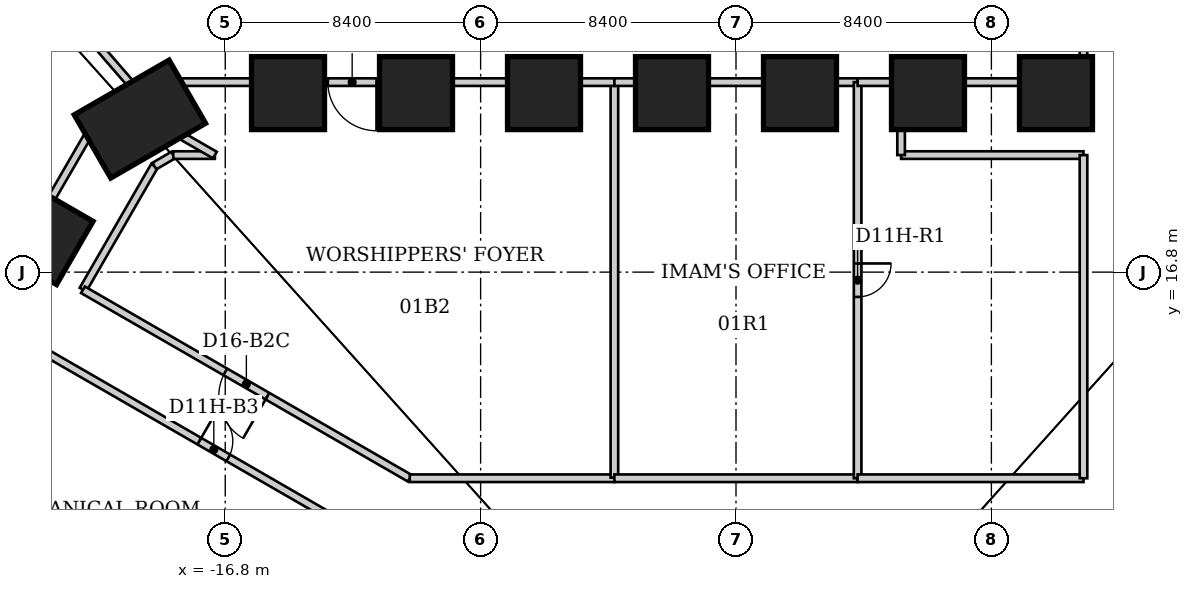
"""IFC4 building model, lengths in metres.
Left out: names, types, materials, properties, quantities, classifications, styles, units other than length and angle.
Written with IfcOpenShell. Run it as: python <this file> out.ifc"""

import sys

from ifc_helpers import new_model, si_unit, direction, frame, frame_2d, origin, origin_2d, place, context, subcontext, project, spatial, rectangle, extrude, element, fill, save


model = new_model("IFC4")
c1 = context("Model", 3, precision=1e-05, world=origin(), true_north=direction((0.0, 1.0)))
c2 = subcontext(c1, "Body", "Model", "MODEL_VIEW")
j1 = project(units=[si_unit("LENGTHUNIT", "METRE"), si_unit("PLANEANGLEUNIT", "RADIAN")], contexts=[c1])
p1 = place(None, origin())
s1 = spatial("IfcSite", under=j1, at=p1, CompositionType="ELEMENT")
p2 = place(p1, origin())
s2 = spatial("IfcBuilding", under=s1, at=p2, CompositionType="ELEMENT")
p3 = place(p2, frame((0.0, 0.0, 6.0)))
s3 = spatial("IfcBuildingStorey", under=s2, at=p3, CompositionType="ELEMENT", Elevation=6.0)
for number, where, z_axis, x_axis in (
    (1, (-14.735, 22.689, 0.0), (0.0, 0.0, 1.0), (0.0, 1.0, 0.0)),
    (2, (-10.525, 22.689, 0.0), (0.0, 0.0, 1.0), (0.0, 1.0, 0.0)),
    (3, (-6.315, 22.689, 0.0), (0.0, 0.0, 1.0), (0.0, 1.0, 0.0)),
    (4, (-2.105, 22.689, 0.0), (0.0, 0.0, 1.0), (0.0, 1.0, 0.0)),
    (5, (2.105, 22.689, 0.0), (0.0, 0.0, 1.0), (0.0, 1.0, 0.0)),
    (6, (6.315, 22.689, 0.0), (0.0, 0.0, 1.0), (0.0, 1.0, 0.0)),
    (7, (10.525, 22.689, 0.0), (0.0, 0.0, 1.0), (0.0, 1.0, 0.0)),
    (8, (-22.788, 18.032, 0.0), (0.0, 0.0, 1.0), (-0.866, 0.5, 0.0)),
):
    element("IfcColumn", number, at=place(p3, frame(where, z_axis=z_axis, x_axis=x_axis)), inside=s3, PredefinedType="COLUMN", context=c2, shape_type="SweptSolid", body=[
        extrude(rectangle(XDim=2.4, YDim=2.4, at=origin_2d()), origin(), (0.0, 0.0, 1.0), 6.0),
    ])
p4 = place(p3, frame((-19.606, 21.835, 0.0), z_axis=(0.0, 0.0, 1.0), x_axis=(-0.5, 0.866025403784, 0.0)))
e9 = element("IfcColumn", 9, at=p4, inside=s3, PredefinedType="COLUMN", context=c2, shape_type="SweptSolid", body=[
    extrude(rectangle(XDim=2.4, YDim=3.6, at=origin_2d()), origin(), (0.0, 0.0, 1.0), 6.0),
])
p5 = place(p3, frame((-22.68, 14.14, 0.0), z_axis=(0.0, 0.0, 1.0), x_axis=(0.866256251028, -0.499599947513, 0.0)))
e10 = element("IfcWall", 10, at=p5, inside=s3, PredefinedType="PARTITIONING", context=c2, shape_type="SweptSolid", body=[
    extrude(rectangle(XDim=12.71, YDim=0.25, at=frame_2d((6.355, 0.0))), origin(), (0.0, 0.0, 1.0), 5.84),
])
p6 = place(p5, frame((5.805, 0.0, 0.0)))
e11 = element("IfcOpeningElement", 11, at=p6, cuts=e10, PredefinedType="OPENING", context=c2, shape_type="SweptSolid", body=[
    extrude(rectangle(XDim=1.1, YDim=2.2, at=frame_2d((0.55, 1.1))), frame((0.0, 0.125, 0.0), z_axis=(0.0, -1.0, 0.0), x_axis=(1.0, 0.0, 0.0)), (0.0, 0.0, 1.0), 0.25),
])
p7 = place(p3, frame((-21.48, 16.22, 0.0), z_axis=(0.0, 0.0, 1.0), x_axis=(0.499999753078, 0.866025546345, 0.0)))
e12 = element("IfcWall", 12, at=p7, inside=s3, PredefinedType="PARTITIONING", context=c2, shape_type="SweptSolid", body=[
    extrude(rectangle(XDim=4.7, YDim=0.25, at=frame_2d((2.35, 0.0))), origin(), (0.0, 0.0, 1.0), 5.84),
])
p8 = place(p3, frame((-20.88, 22.05, 0.0), z_axis=(0.0, 0.0, 1.0), x_axis=(-0.50097690648, -0.86546065143, 0.0)))
e13 = element("IfcWall", 13, at=p8, inside=s3, PredefinedType="PARTITIONING", context=c2, shape_type="SweptSolid", body=[
    extrude(rectangle(XDim=5.35, YDim=0.25, at=frame_2d((2.675, 0.0))), origin(), (0.0, 0.0, 1.0), 4.04),
])
p9 = place(p3, frame((-20.23, 22.43, 0.0), z_axis=(0.0, 0.0, 1.0), x_axis=(-0.863331575042, -0.504637088942, 0.0)))
e14 = element("IfcWall", 14, at=p9, inside=s3, PredefinedType="PARTITIONING", context=c2, shape_type="SweptSolid", body=[
    extrude(rectangle(XDim=0.753, YDim=0.25, at=frame_2d((0.376, 0.0))), origin(), (0.0, 0.0, 1.0), 5.84),
])
p10 = place(p3, frame((-19.746, 22.708, 0.0), z_axis=(0.0, 0.0, 1.0), x_axis=(-0.867257505244, -0.49785983931, 0.0)))
e15 = element("IfcWall", 15, at=p10, inside=s3, PredefinedType="PARTITIONING", context=c2, shape_type="SweptSolid", body=[
    extrude(rectangle(XDim=0.443, YDim=0.25, at=frame_2d((0.221, 0.0))), origin(), (0.0, 0.0, 1.0), 5.84),
])
p11 = place(p3, frame((-19.69, 22.74, 0.0), z_axis=(0.0, 0.0, 1.0), x_axis=(-0.654569518712, 0.756001815589, 0.0)))
e16 = element("IfcWall", 16, at=p11, inside=s3, PredefinedType="PARTITIONING", context=c2, shape_type="SweptSolid", body=[
    extrude(rectangle(XDim=13.674, YDim=0.25, at=frame_2d((6.837, 0.0))), origin(), (0.0, 0.0, 1.0), 5.75),
])
p12 = place(p3, frame((-19.15, 23.05, 0.0), z_axis=(0.0, 0.0, 1.0), x_axis=(-0.867193315, -0.497971640175, 0.0)))
e17 = element("IfcWall", 17, at=p12, inside=s3, PredefinedType="PARTITIONING", context=c2, shape_type="SweptSolid", body=[
    extrude(rectangle(XDim=0.588, YDim=0.25, at=frame_2d((0.294, 0.0))), origin(), (0.0, 0.0, 1.0), 5.84),
])
p13 = place(p3, frame((-19.13, 20.29, 0.0), z_axis=(0.0, 0.0, 1.0), x_axis=(0.864827114446, 0.502069778138, 0.0)))
e18 = element("IfcWall", 18, at=p13, inside=s3, PredefinedType="PARTITIONING", context=c2, shape_type="SweptSolid", body=[
    extrude(rectangle(XDim=0.717, YDim=0.25, at=frame_2d((0.358, 0.0))), origin(), (0.0, 0.0, 1.0), 5.84),
])
p14 = place(p3, frame((-18.51, 20.65, 0.0), z_axis=(0.0, 0.0, 1.0), x_axis=(1.0, 0.0, 0.0)))
e19 = element("IfcWall", 19, at=p14, inside=s3, PredefinedType="PARTITIONING", context=c2, shape_type="SweptSolid", body=[
    extrude(rectangle(XDim=1.37, YDim=0.25, at=frame_2d((0.685, 0.0))), origin(), (0.0, 0.0, 1.0), 5.84),
])
p15 = place(p3, frame((-17.14, 20.65, 0.0), z_axis=(0.0, 0.0, 1.0), x_axis=(-0.866514787199, 0.49915140345, 0.0)))
e20 = element("IfcWall", 20, at=p15, inside=s3, PredefinedType="PARTITIONING", context=c2, shape_type="SweptSolid", body=[
    extrude(rectangle(XDim=3.566, YDim=0.25, at=frame_2d((1.783, 0.0))), origin(), (0.0, 0.0, 1.0), 5.84),
])
p16 = place(p3, frame((-10.73, 10.02, 0.0), z_axis=(0.0, 0.0, 1.0), x_axis=(-0.866254357941, 0.499603229922, 0.0)))
e21 = element("IfcWall", 21, at=p16, inside=s3, PredefinedType="PARTITIONING", context=c2, shape_type="SweptSolid", body=[
    extrude(rectangle(XDim=12.41, YDim=0.25, at=frame_2d((6.205, 0.0))), origin(), (0.0, 0.0, 1.0), 5.84),
])
p17 = place(p16, frame((5.405, 0.0, 0.0)))
e22 = element("IfcOpeningElement", 22, at=p17, cuts=e21, PredefinedType="OPENING", context=c2, shape_type="SweptSolid", body=[
    extrude(rectangle(XDim=1.6, YDim=2.4, at=frame_2d((0.8, 1.2))), frame((0.0, 0.125, 0.0), z_axis=(0.0, -1.0, 0.0), x_axis=(1.0, 0.0, 0.0)), (0.0, 0.0, 1.0), 0.25),
])
p18 = place(p3, frame((-4.0, 10.02, 0.0), z_axis=(0.0, 0.0, 1.0), x_axis=(-1.0, 0.0, 0.0)))
e23 = element("IfcWall", 23, at=p18, inside=s3, PredefinedType="PARTITIONING", context=c2, shape_type="SweptSolid", body=[
    extrude(rectangle(XDim=6.73, YDim=0.25, at=frame_2d((3.365, 0.0))), origin(), (0.0, 0.0, 1.0), 5.84),
])
p19 = place(p3, frame((-4.0, 10.04, 0.0), z_axis=(0.0, 0.0, 1.0), x_axis=(0.0, 1.0, 0.0)))
e24 = element("IfcWall", 24, at=p19, inside=s3, PredefinedType="PARTITIONING", context=c2, shape_type="SweptSolid", body=[
    extrude(rectangle(XDim=13.01, YDim=0.25, at=frame_2d((6.505, 0.0))), origin(), (0.0, 0.0, 1.0), 5.84),
])
p20 = place(p3, frame((-4.0, 23.05, 0.0), z_axis=(0.0, 0.0, 1.0), x_axis=(-1.0, 0.0, 0.0)))
e25 = element("IfcWall", 25, at=p20, inside=s3, PredefinedType="PARTITIONING", context=c2, shape_type="SweptSolid", body=[
    extrude(rectangle(XDim=15.15, YDim=0.25, at=frame_2d((7.575, 0.0))), origin(), (0.0, 0.0, 1.0), 4.04),
])
p21 = place(p20, frame((7.825, 0.0, 0.0)))
e26 = element("IfcOpeningElement", 26, at=p21, cuts=e25, PredefinedType="OPENING", context=c2, shape_type="SweptSolid", body=[
    extrude(rectangle(XDim=1.6, YDim=2.4, at=frame_2d((0.8, 1.2))), frame((0.0, 0.125, 0.0), z_axis=(0.0, -1.0, 0.0), x_axis=(1.0, 0.0, 0.0)), (0.0, 0.0, 1.0), 0.25),
])
p22 = place(p3, frame((4.0, 10.02, 0.0), z_axis=(0.0, 0.0, 1.0), x_axis=(-1.0, 0.0, 0.0)))
e27 = element("IfcWall", 27, at=p22, inside=s3, PredefinedType="PARTITIONING", context=c2, shape_type="SweptSolid", body=[
    extrude(rectangle(XDim=8.0, YDim=0.25, at=frame_2d((4.0, 0.0))), origin(), (0.0, 0.0, 1.0), 5.84),
])
p23 = place(p3, frame((4.0, 23.05, 0.0), z_axis=(0.0, 0.0, 1.0), x_axis=(-1.0, 0.0, 0.0)))
e28 = element("IfcWall", 28, at=p23, inside=s3, PredefinedType="PARTITIONING", context=c2, shape_type="SweptSolid", body=[
    extrude(rectangle(XDim=8.0, YDim=0.25, at=frame_2d((4.0, 0.0))), origin(), (0.0, 0.0, 1.0), 4.04),
])
p24 = place(p3, frame((4.0, 23.05, 0.0), z_axis=(0.0, 0.0, 1.0), x_axis=(0.0, -1.0, 0.0)))
e29 = element("IfcWall", 29, at=p24, inside=s3, PredefinedType="PARTITIONING", context=c2, shape_type="SweptSolid", body=[
    extrude(rectangle(XDim=13.03, YDim=0.25, at=frame_2d((6.515, 0.0))), origin(), (0.0, 0.0, 1.0), 5.84),
])
p25 = place(p24, frame((5.965, 0.0, 0.0)))
e30 = element("IfcOpeningElement", 30, at=p25, cuts=e29, PredefinedType="OPENING", context=c2, shape_type="SweptSolid", body=[
    extrude(rectangle(XDim=1.1, YDim=2.2, at=frame_2d((0.55, 1.1))), frame((0.0, 0.125, 0.0), z_axis=(0.0, -1.0, 0.0), x_axis=(1.0, 0.0, 0.0)), (0.0, 0.0, 1.0), 0.25),
])
p26 = place(p3, frame((5.43, 20.65, 0.0), z_axis=(0.0, 0.0, 1.0), x_axis=(1.0, 0.0, 0.0)))
e31 = element("IfcWall", 31, at=p26, inside=s3, PredefinedType="PARTITIONING", context=c2, shape_type="SweptSolid", body=[
    extrude(rectangle(XDim=6.0, YDim=0.25, at=frame_2d((3.0, 0.0))), origin(), (0.0, 0.0, 1.0), 5.84),
])
p27 = place(p3, frame((5.43, 23.05, 0.0), z_axis=(0.0, 0.0, 1.0), x_axis=(-1.0, 0.0, 0.0)))
e32 = element("IfcWall", 32, at=p27, inside=s3, PredefinedType="PARTITIONING", context=c2, shape_type="SweptSolid", body=[
    extrude(rectangle(XDim=1.43, YDim=0.25, at=frame_2d((0.715, 0.0))), origin(), (0.0, 0.0, 1.0), 4.04),
])
p28 = place(p3, frame((5.43, 23.05, 0.0), z_axis=(0.0, 0.0, 1.0), x_axis=(0.0, -1.0, 0.0)))
e33 = element("IfcWall", 33, at=p28, inside=s3, PredefinedType="PARTITIONING", context=c2, shape_type="SweptSolid", body=[
    extrude(rectangle(XDim=2.4, YDim=0.25, at=frame_2d((1.2, 0.0))), origin(), (0.0, 0.0, 1.0), 5.84),
])
p29 = place(p3, frame((11.43, 10.02, 0.0), z_axis=(0.0, 0.0, 1.0), x_axis=(-1.0, 0.0, 0.0)))
e34 = element("IfcWall", 34, at=p29, inside=s3, PredefinedType="PARTITIONING", context=c2, shape_type="SweptSolid", body=[
    extrude(rectangle(XDim=7.43, YDim=0.25, at=frame_2d((3.715, 0.0))), origin(), (0.0, 0.0, 1.0), 5.84),
])
p30 = place(p3, frame((11.43, 20.65, 0.0), z_axis=(0.0, 0.0, 1.0), x_axis=(0.0, -1.0, 0.0)))
e35 = element("IfcWall", 35, at=p30, inside=s3, PredefinedType="PARTITIONING", context=c2, shape_type="SweptSolid", body=[
    extrude(rectangle(XDim=10.63, YDim=0.25, at=frame_2d((5.315, 0.0))), origin(), (0.0, 0.0, 1.0), 5.84),
])
p31 = place(p3, frame((11.43, 23.05, 0.0), z_axis=(0.0, 0.0, 1.0), x_axis=(-1.0, 0.0, 0.0)))
e36 = element("IfcWall", 36, at=p31, inside=s3, PredefinedType="PARTITIONING", context=c2, shape_type="SweptSolid", body=[
    extrude(rectangle(XDim=6.0, YDim=0.25, at=frame_2d((3.0, 0.0))), origin(), (0.0, 0.0, 1.0), 4.04),
])
p32 = place(p3, frame((11.43, 25.2, 0.0), z_axis=(0.0, 0.0, 1.0), x_axis=(0.0, -1.0, 0.0)))
e37 = element("IfcWall", 37, at=p32, inside=s3, PredefinedType="PARTITIONING", context=c2, shape_type="SweptSolid", body=[
    extrude(rectangle(XDim=2.15, YDim=0.25, at=frame_2d((1.075, 0.0))), origin(), (0.0, 0.0, 1.0), 5.84),
])
p33 = place(p3, frame((12.23, 3.24, 0.0), z_axis=(0.0, 0.0, 1.0), x_axis=(0.866071776036, 0.499919672301, 0.0)))
e38 = element("IfcWall", 38, at=p33, inside=s3, PredefinedType="PARTITIONING", context=c2, shape_type="SweptSolid", body=[
    extrude(rectangle(XDim=14.502, YDim=0.25, at=frame_2d((7.251, 0.0))), origin(), (0.0, 0.0, 1.0), 5.84),
])
p34 = place(p21, origin())
e39 = element("IfcDoor", 39, at=p34, inside=s3, OperationType="DOUBLE_DOOR_SINGLE_SWING", PredefinedType="DOOR", context=c2, shape_type="SweptSolid", body=[
    extrude(rectangle(XDim=1.6, YDim=2.4, at=frame_2d((0.8, 1.2))), frame((0.0, 0.025, 0.0), z_axis=(0.0, -1.0, 0.0), x_axis=(1.0, 0.0, 0.0)), (0.0, 0.0, 1.0), 0.05),
])
fill(e26, e39)
p35 = place(p25, origin())
e40 = element("IfcDoor", 40, at=p35, inside=s3, OperationType="SINGLE_SWING_LEFT", PredefinedType="DOOR", context=c2, shape_type="SweptSolid", body=[
    extrude(rectangle(XDim=1.1, YDim=2.2, at=frame_2d((0.55, 1.1))), frame((0.0, 0.025, 0.0), z_axis=(0.0, -1.0, 0.0), x_axis=(1.0, 0.0, 0.0)), (0.0, 0.0, 1.0), 0.05),
])
fill(e30, e40)
p36 = place(p6, origin())
e41 = element("IfcDoor", 41, at=p36, inside=s3, OperationType="SINGLE_SWING_LEFT", PredefinedType="DOOR", context=c2, shape_type="SweptSolid", body=[
    extrude(rectangle(XDim=1.1, YDim=2.2, at=frame_2d((0.55, 1.1))), frame((0.0, 0.025, 0.0), z_axis=(0.0, -1.0, 0.0), x_axis=(1.0, 0.0, 0.0)), (0.0, 0.0, 1.0), 0.05),
])
fill(e11, e41)
p37 = place(p17, origin())
e42 = element("IfcDoor", 42, at=p37, inside=s3, OperationType="DOUBLE_DOOR_SINGLE_SWING", PredefinedType="DOOR", context=c2, shape_type="SweptSolid", body=[
    extrude(rectangle(XDim=1.6, YDim=2.4, at=frame_2d((0.8, 1.2))), frame((0.0, 0.025, 0.0), z_axis=(0.0, -1.0, 0.0), x_axis=(1.0, 0.0, 0.0)), (0.0, 0.0, 1.0), 0.05),
])
fill(e22, e42)
save(model, sys.argv[1])
